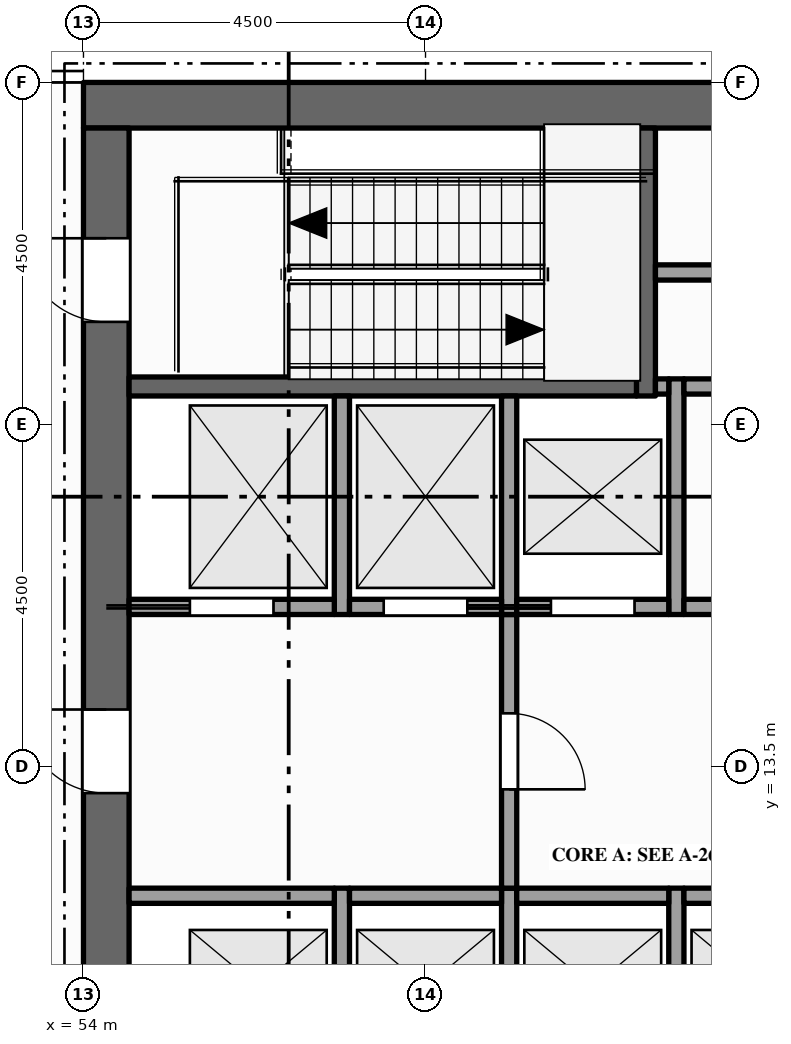
"""IFC4 building model, lengths in metres.
Left out: names, types, materials, properties, quantities, classifications, styles, units other than length and angle.
Written with IfcOpenShell. Run it as: python <this file> out.ifc"""

import sys

from ifc_helpers import new_model, si_unit, direction, frame, frame_2d, origin, place, context, subcontext, project, spatial, rectangle, extrude, element, fill, save


model = new_model("IFC4")
c1 = context("Model", 3, precision=1e-05, world=origin(), true_north=direction((0.0, 1.0)))
c2 = subcontext(c1, "Body", "Model", "MODEL_VIEW")
j1 = project(units=[si_unit("LENGTHUNIT", "METRE"), si_unit("PLANEANGLEUNIT", "RADIAN")], contexts=[c1])
p1 = place(None, origin())
s1 = spatial("IfcSite", under=j1, at=p1, CompositionType="ELEMENT")
p2 = place(p1, origin())
s2 = spatial("IfcBuilding", under=s1, at=p2, CompositionType="ELEMENT")
p3 = place(p2, frame((0.0, 0.0, 336.5)))
s3 = spatial("IfcBuildingStorey", under=s2, at=p3, CompositionType="ELEMENT", Elevation=336.5)
p4 = place(p3, frame((54.0, 22.2, -0.15), z_axis=(0.0, 0.0, 1.0), x_axis=(1.0, 0.0, 0.0)))
e1 = element("IfcWall", 1, at=p4, inside=s3, PredefinedType="SHEAR", context=c2, shape_type="SweptSolid", body=[
    extrude(rectangle(XDim=13.5, YDim=0.6, at=frame_2d((6.75, 0.0))), origin(), (0.0, 0.0, 1.0), 4.5),
])
p5 = place(p3, frame((54.3, 0.6, -0.15), z_axis=(0.0, 0.0, 1.0), x_axis=(0.0, 1.0, 0.0)))
e2 = element("IfcWall", 2, at=p5, inside=s3, PredefinedType="SHEAR", context=c2, shape_type="SweptSolid", body=[
    extrude(rectangle(XDim=21.3, YDim=0.6, at=frame_2d((10.65, 0.0))), origin(), (0.0, 0.0, 1.0), 4.5),
])
p6 = place(p5, frame((6.5, 0.0, 0.15)))
e3 = element("IfcOpeningElement", 3, at=p6, cuts=e2, PredefinedType="OPENING", context=c2, shape_type="SweptSolid", body=[
    extrude(rectangle(XDim=1.8, YDim=2.1, at=frame_2d((0.9, 1.05))), frame((0.0, 0.31, 0.0), z_axis=(0.0, -1.0, 0.0), x_axis=(1.0, 0.0, 0.0)), (0.0, 0.0, 1.0), 0.62),
])
p7 = place(p5, frame((12.55, 0.0, 0.15)))
e4 = element("IfcOpeningElement", 4, at=p7, cuts=e2, PredefinedType="OPENING", context=c2, shape_type="SweptSolid", body=[
    extrude(rectangle(XDim=1.1, YDim=2.1, at=frame_2d((0.55, 1.05))), frame((0.0, 0.31, 0.0), z_axis=(0.0, -1.0, 0.0), x_axis=(1.0, 0.0, 0.0)), (0.0, 0.0, 1.0), 0.62),
])
p8 = place(p5, frame((1.55, 0.0, 0.15)))
e5 = element("IfcOpeningElement", 5, at=p8, cuts=e2, PredefinedType="OPENING", context=c2, shape_type="SweptSolid", body=[
    extrude(rectangle(XDim=1.1, YDim=2.1, at=frame_2d((0.55, 1.05))), frame((0.0, 0.31, 0.0), z_axis=(0.0, -1.0, 0.0), x_axis=(1.0, 0.0, 0.0)), (0.0, 0.0, 1.0), 0.62),
])
p9 = place(p5, frame((18.75, 0.0, 0.15)))
e6 = element("IfcOpeningElement", 6, at=p9, cuts=e2, PredefinedType="OPENING", context=c2, shape_type="SweptSolid", body=[
    extrude(rectangle(XDim=1.1, YDim=2.1, at=frame_2d((0.55, 1.05))), frame((0.0, 0.31, 0.0), z_axis=(0.0, -1.0, 0.0), x_axis=(1.0, 0.0, 0.0)), (0.0, 0.0, 1.0), 0.62),
])
p10 = place(p3, frame((57.4, 9.3, 0.0), z_axis=(0.0, 0.0, 1.0), x_axis=(0.0, 1.0, 0.0)))
e7 = element("IfcWall", 7, at=p10, inside=s3, PredefinedType="SOLIDWALL", context=c2, shape_type="SweptSolid", body=[
    extrude(rectangle(XDim=2.6, YDim=0.2, at=frame_2d((1.3, 0.0))), origin(), (0.0, 0.0, 1.0), 4.35),
])
p11 = place(p3, frame((57.4, 15.5, 0.0), z_axis=(0.0, 0.0, 1.0), x_axis=(0.0, 1.0, 0.0)))
e8 = element("IfcWall", 8, at=p11, inside=s3, PredefinedType="SOLIDWALL", context=c2, shape_type="SweptSolid", body=[
    extrude(rectangle(XDim=2.875, YDim=0.2, at=frame_2d((1.438, 0.0))), origin(), (0.0, 0.0, 1.0), 4.35),
])
p12 = place(p3, frame((59.6, 9.3, 0.0), z_axis=(0.0, 0.0, 1.0), x_axis=(0.0, 1.0, 0.0)))
e9 = element("IfcWall", 9, at=p12, inside=s3, PredefinedType="SOLIDWALL", context=c2, shape_type="SweptSolid", body=[
    extrude(rectangle(XDim=2.6, YDim=0.2, at=frame_2d((1.3, 0.0))), origin(), (0.0, 0.0, 1.0), 4.35),
])
p13 = place(p3, frame((59.6, 11.9, 0.0), z_axis=(0.0, 0.0, 1.0), x_axis=(0.0, 1.0, 0.0)))
e10 = element("IfcWall", 10, at=p13, inside=s3, PredefinedType="PARTITIONING", context=c2, shape_type="SweptSolid", body=[
    extrude(rectangle(XDim=3.6, YDim=0.2, at=frame_2d((1.8, 0.0))), origin(), (0.0, 0.0, 1.0), 4.35),
])
p14 = place(p13, frame((1.3, 0.0, 0.0)))
e11 = element("IfcOpeningElement", 11, at=p14, cuts=e10, PredefinedType="OPENING", context=c2, shape_type="SweptSolid", body=[
    extrude(rectangle(XDim=1.0, YDim=2.1, at=frame_2d((0.5, 1.05))), frame((0.0, 0.11, 0.0), z_axis=(0.0, -1.0, 0.0), x_axis=(1.0, 0.0, 0.0)), (0.0, 0.0, 1.0), 0.22),
])
p15 = place(p3, frame((59.6, 15.5, 0.0), z_axis=(0.0, 0.0, 1.0), x_axis=(0.0, 1.0, 0.0)))
e12 = element("IfcWall", 12, at=p15, inside=s3, PredefinedType="SOLIDWALL", context=c2, shape_type="SweptSolid", body=[
    extrude(rectangle(XDim=2.875, YDim=0.2, at=frame_2d((1.438, 0.0))), origin(), (0.0, 0.0, 1.0), 4.35),
])
p16 = place(p3, frame((61.4, 18.375, 0.0), z_axis=(0.0, 0.0, 1.0), x_axis=(0.0, 1.0, 0.0)))
e13 = element("IfcWall", 13, at=p16, inside=s3, PredefinedType="SHEAR", context=c2, shape_type="SweptSolid", body=[
    extrude(rectangle(XDim=3.525, YDim=0.25, at=frame_2d((1.762, 0.0))), origin(), (0.0, 0.0, 1.0), 4.35),
])
p17 = place(p3, frame((61.8, 9.3, 0.0), z_axis=(0.0, 0.0, 1.0), x_axis=(0.0, 1.0, 0.0)))
e14 = element("IfcWall", 14, at=p17, inside=s3, PredefinedType="SOLIDWALL", context=c2, shape_type="SweptSolid", body=[
    extrude(rectangle(XDim=2.6, YDim=0.2, at=frame_2d((1.3, 0.0))), origin(), (0.0, 0.0, 1.0), 4.35),
])
p18 = place(p3, frame((61.8, 15.5, 0.0), z_axis=(0.0, 0.0, 1.0), x_axis=(0.0, 1.0, 0.0)))
e15 = element("IfcWall", 15, at=p18, inside=s3, PredefinedType="SOLIDWALL", context=c2, shape_type="SweptSolid", body=[
    extrude(rectangle(XDim=3.1, YDim=0.2, at=frame_2d((1.55, 0.0))), origin(), (0.0, 0.0, 1.0), 4.35),
])
p19 = place(p3, frame((54.6, 11.8, 0.0), z_axis=(0.0, 0.0, 1.0), x_axis=(1.0, 0.0, 0.0)))
e16 = element("IfcWall", 16, at=p19, inside=s3, PredefinedType="SOLIDWALL", context=c2, shape_type="SweptSolid", body=[
    extrude(rectangle(XDim=2.7, YDim=0.2, at=frame_2d((1.35, 0.0))), origin(), (0.0, 0.0, 1.0), 4.35),
])
for number, where, z_axis, x_axis in (
    (17, (57.5, 11.8, 0.0), (0.0, 0.0, 1.0), (1.0, 0.0, 0.0)),
    (18, (59.7, 11.8, 0.0), (0.0, 0.0, 1.0), (1.0, 0.0, 0.0)),
):
    element("IfcWall", number, at=place(p3, frame(where, z_axis=z_axis, x_axis=x_axis)), inside=s3, PredefinedType="SOLIDWALL", context=c2, shape_type="SweptSolid", body=[
        extrude(rectangle(XDim=2.0, YDim=0.2, at=frame_2d((1.0, 0.0))), origin(), (0.0, 0.0, 1.0), 4.35),
    ])
p20 = place(p3, frame((61.9, 11.8, 0.0), z_axis=(0.0, 0.0, 1.0), x_axis=(1.0, 0.0, 0.0)))
e19 = element("IfcWall", 19, at=p20, inside=s3, PredefinedType="SOLIDWALL", context=c2, shape_type="SweptSolid", body=[
    extrude(rectangle(XDim=1.95, YDim=0.2, at=frame_2d((0.975, 0.0))), origin(), (0.0, 0.0, 1.0), 4.35),
])
p21 = place(p3, frame((54.6, 15.6, 0.0), z_axis=(0.0, 0.0, 1.0), x_axis=(1.0, 0.0, 0.0)))
e20 = element("IfcWall", 20, at=p21, inside=s3, PredefinedType="SOLIDWALL", context=c2, shape_type="SweptSolid", body=[
    extrude(rectangle(XDim=2.7, YDim=0.2, at=frame_2d((1.35, 0.0))), origin(), (0.0, 0.0, 1.0), 4.35),
])
p22 = place(p21, frame((0.8, 0.0, 0.012)))
e21 = element("IfcOpeningElement", 21, at=p22, cuts=e20, PredefinedType="OPENING", context=c2, shape_type="SweptSolid", body=[
    extrude(rectangle(XDim=1.1, YDim=2.1, at=frame_2d((0.55, 1.05))), frame((0.0, 0.11, 0.0), z_axis=(0.0, -1.0, 0.0), x_axis=(1.0, 0.0, 0.0)), (0.0, 0.0, 1.0), 0.22),
])
p23 = place(p3, frame((57.5, 15.6, 0.0), z_axis=(0.0, 0.0, 1.0), x_axis=(1.0, 0.0, 0.0)))
e22 = element("IfcWall", 22, at=p23, inside=s3, PredefinedType="SOLIDWALL", context=c2, shape_type="SweptSolid", body=[
    extrude(rectangle(XDim=2.0, YDim=0.2, at=frame_2d((1.0, 0.0))), origin(), (0.0, 0.0, 1.0), 4.35),
])
p24 = place(p23, frame((0.45, 0.0, 0.012)))
e23 = element("IfcOpeningElement", 23, at=p24, cuts=e22, PredefinedType="OPENING", context=c2, shape_type="SweptSolid", body=[
    extrude(rectangle(XDim=1.1, YDim=2.1, at=frame_2d((0.55, 1.05))), frame((0.0, 0.11, 0.0), z_axis=(0.0, -1.0, 0.0), x_axis=(1.0, 0.0, 0.0)), (0.0, 0.0, 1.0), 0.22),
])
p25 = place(p3, frame((59.7, 15.6, 0.0), z_axis=(0.0, 0.0, 1.0), x_axis=(1.0, 0.0, 0.0)))
e24 = element("IfcWall", 24, at=p25, inside=s3, PredefinedType="SOLIDWALL", context=c2, shape_type="SweptSolid", body=[
    extrude(rectangle(XDim=2.0, YDim=0.2, at=frame_2d((1.0, 0.0))), origin(), (0.0, 0.0, 1.0), 4.35),
])
p26 = place(p25, frame((0.45, 0.0, 0.012)))
e25 = element("IfcOpeningElement", 25, at=p26, cuts=e24, PredefinedType="OPENING", context=c2, shape_type="SweptSolid", body=[
    extrude(rectangle(XDim=1.1, YDim=2.1, at=frame_2d((0.55, 1.05))), frame((0.0, 0.11, 0.0), z_axis=(0.0, -1.0, 0.0), x_axis=(1.0, 0.0, 0.0)), (0.0, 0.0, 1.0), 0.22),
])
p27 = place(p3, frame((61.9, 15.6, 0.0), z_axis=(0.0, 0.0, 1.0), x_axis=(1.0, 0.0, 0.0)))
e26 = element("IfcWall", 26, at=p27, inside=s3, PredefinedType="PARTITIONING", context=c2, shape_type="SweptSolid", body=[
    extrude(rectangle(XDim=1.95, YDim=0.2, at=frame_2d((0.975, 0.0))), origin(), (0.0, 0.0, 1.0), 4.35),
])
p28 = place(p27, frame((0.525, 0.0, 0.0)))
e27 = element("IfcOpeningElement", 27, at=p28, cuts=e26, PredefinedType="OPENING", context=c2, shape_type="SweptSolid", body=[
    extrude(rectangle(XDim=0.9, YDim=2.1, at=frame_2d((0.45, 1.05))), frame((0.0, 0.11, 0.0), z_axis=(0.0, -1.0, 0.0), x_axis=(1.0, 0.0, 0.0)), (0.0, 0.0, 1.0), 0.22),
])
p29 = place(p3, frame((54.6, 18.5, 0.0), z_axis=(0.0, 0.0, 1.0), x_axis=(1.0, 0.0, 0.0)))
e28 = element("IfcWall", 28, at=p29, inside=s3, PredefinedType="SHEAR", context=c2, shape_type="SweptSolid", body=[
    extrude(rectangle(XDim=6.675, YDim=0.25, at=frame_2d((3.337, 0.0))), origin(), (0.0, 0.0, 1.0), 4.35),
])
p30 = place(p3, frame((61.525, 18.5, 0.0), z_axis=(0.0, 0.0, 1.0), x_axis=(1.0, 0.0, 0.0)))
e29 = element("IfcWall", 29, at=p30, inside=s3, PredefinedType="SOLIDWALL", context=c2, shape_type="SweptSolid", body=[
    extrude(rectangle(XDim=0.175, YDim=0.2, at=frame_2d((0.087, 0.0))), origin(), (0.0, 0.0, 1.0), 4.35),
])
p31 = place(p3, frame((61.9, 18.5, 0.0), z_axis=(0.0, 0.0, 1.0), x_axis=(1.0, 0.0, 0.0)))
e30 = element("IfcWall", 30, at=p31, inside=s3, PredefinedType="PARTITIONING", context=c2, shape_type="SweptSolid", body=[
    extrude(rectangle(XDim=1.95, YDim=0.2, at=frame_2d((0.975, 0.0))), origin(), (0.0, 0.0, 1.0), 4.35),
])
p32 = place(p3, frame((61.525, 20.0, 0.0), z_axis=(0.0, 0.0, 1.0), x_axis=(1.0, 0.0, 0.0)))
e31 = element("IfcWall", 31, at=p32, inside=s3, PredefinedType="PARTITIONING", context=c2, shape_type="SweptSolid", body=[
    extrude(rectangle(XDim=2.375, YDim=0.2, at=frame_2d((1.188, 0.0))), origin(), (0.0, 0.0, 1.0), 4.35),
])
p33 = place(p22, origin())
e32 = element("IfcDoor", 32, at=p33, inside=s3, OperationType="SLIDING_TO_LEFT", PredefinedType="DOOR", context=c2, shape_type="SweptSolid", body=[
    extrude(rectangle(XDim=1.1, YDim=2.1, at=frame_2d((0.55, 1.05))), frame((0.0, 0.025, 0.0), z_axis=(0.0, -1.0, 0.0), x_axis=(1.0, 0.0, 0.0)), (0.0, 0.0, 1.0), 0.05),
])
fill(e21, e32)
p34 = place(p24, origin())
e33 = element("IfcDoor", 33, at=p34, inside=s3, OperationType="SLIDING_TO_RIGHT", PredefinedType="DOOR", context=c2, shape_type="SweptSolid", body=[
    extrude(rectangle(XDim=1.1, YDim=2.1, at=frame_2d((0.55, 1.05))), frame((0.0, 0.025, 0.0), z_axis=(0.0, -1.0, 0.0), x_axis=(1.0, 0.0, 0.0)), (0.0, 0.0, 1.0), 0.05),
])
fill(e23, e33)
p35 = place(p26, origin())
e34 = element("IfcDoor", 34, at=p35, inside=s3, OperationType="SLIDING_TO_LEFT", PredefinedType="DOOR", context=c2, shape_type="SweptSolid", body=[
    extrude(rectangle(XDim=1.1, YDim=2.1, at=frame_2d((0.55, 1.05))), frame((0.0, 0.025, 0.0), z_axis=(0.0, -1.0, 0.0), x_axis=(1.0, 0.0, 0.0)), (0.0, 0.0, 1.0), 0.05),
])
fill(e25, e34)
p36 = place(p7, origin())
e35 = element("IfcDoor", 35, at=p36, inside=s3, OperationType="SINGLE_SWING_RIGHT", PredefinedType="DOOR", context=c2, shape_type="SweptSolid", body=[
    extrude(rectangle(XDim=1.1, YDim=2.1, at=frame_2d((0.55, 1.05))), frame((0.0, 0.025, 0.0), z_axis=(0.0, -1.0, 0.0), x_axis=(1.0, 0.0, 0.0)), (0.0, 0.0, 1.0), 0.05),
])
fill(e4, e35)
p37 = place(p14, origin())
e36 = element("IfcDoor", 36, at=p37, inside=s3, OperationType="SINGLE_SWING_LEFT", PredefinedType="DOOR", context=c2, shape_type="SweptSolid", body=[
    extrude(rectangle(XDim=1.0, YDim=2.1, at=frame_2d((0.5, 1.05))), frame((0.0, 0.025, 0.0), z_axis=(0.0, -1.0, 0.0), x_axis=(1.0, 0.0, 0.0)), (0.0, 0.0, 1.0), 0.05),
])
fill(e11, e36)
p38 = place(p9, origin())
e37 = element("IfcDoor", 37, at=p38, inside=s3, OperationType="SINGLE_SWING_RIGHT", PredefinedType="DOOR", context=c2, shape_type="SweptSolid", body=[
    extrude(rectangle(XDim=1.1, YDim=2.1, at=frame_2d((0.55, 1.05))), frame((0.0, 0.025, 0.0), z_axis=(0.0, -1.0, 0.0), x_axis=(1.0, 0.0, 0.0)), (0.0, 0.0, 1.0), 0.05),
])
fill(e6, e37)
save(model, sys.argv[1])
